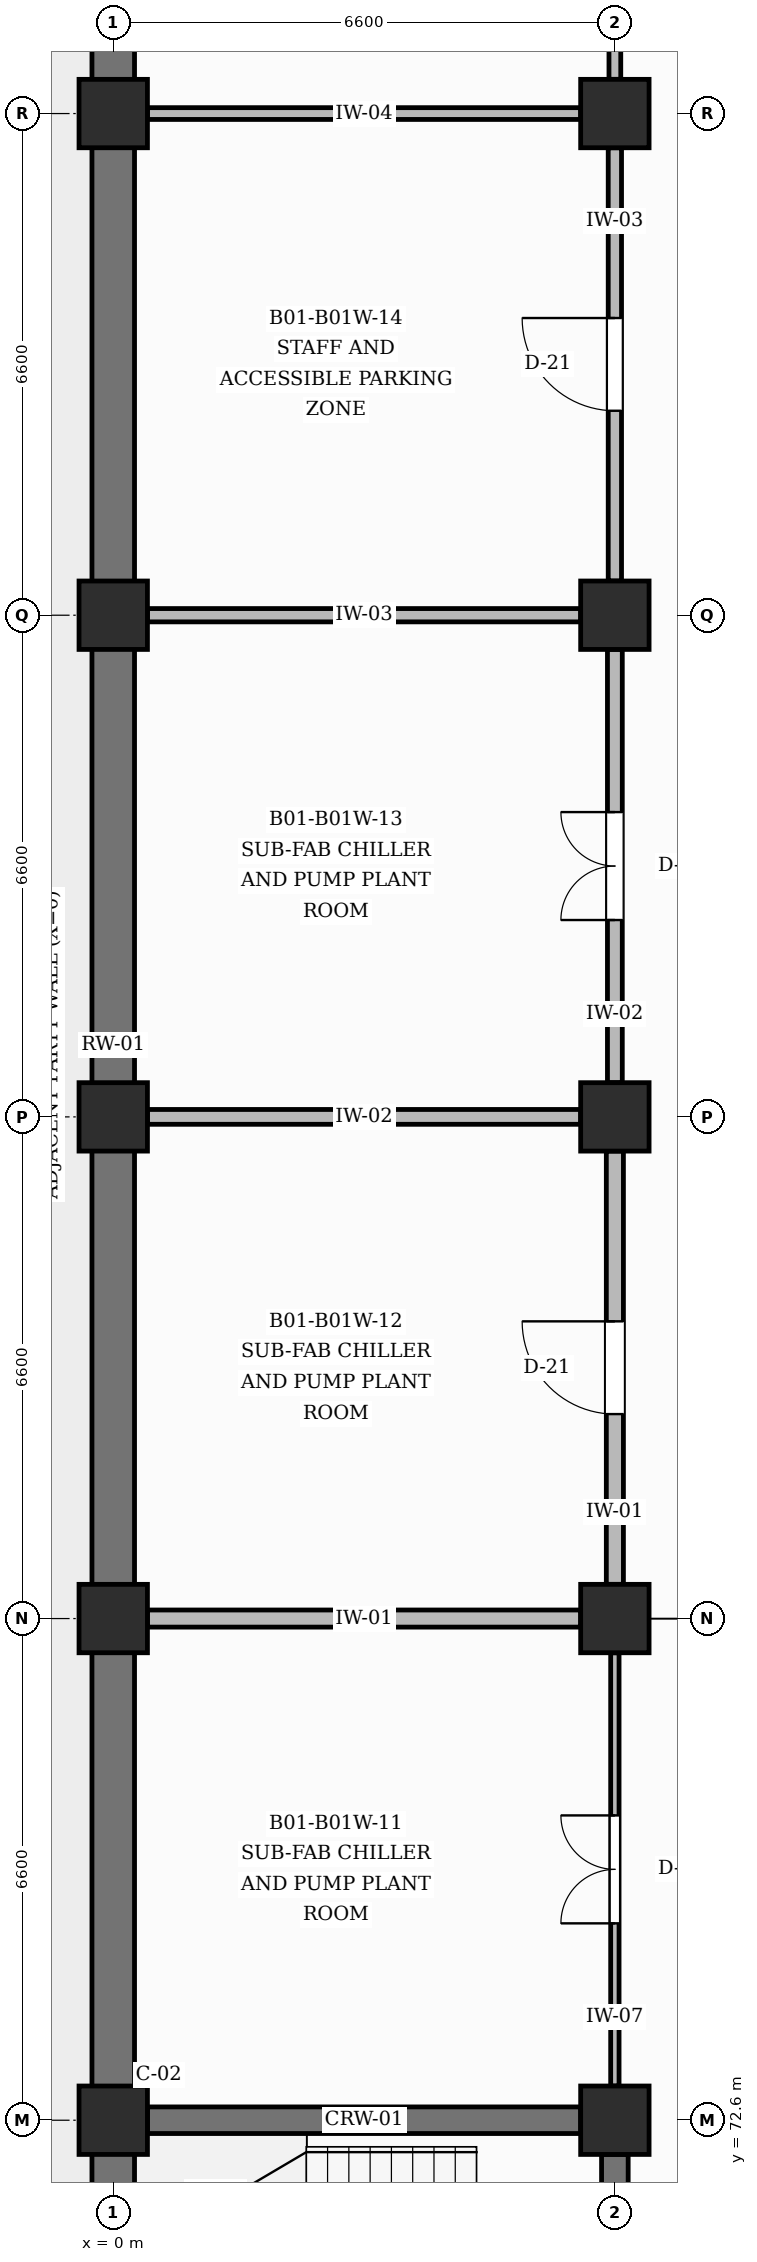
"""IFC4 building model, lengths in metres.
Left out: names, types, materials, properties, quantities, classifications, styles, units other than length and angle.
Written with IfcOpenShell. Run it as: python <this file> out.ifc"""

import sys

from ifc_helpers import new_model, si_unit, direction, frame, frame_2d, origin, origin_2d, place, context, subcontext, project, spatial, rectangle, extrude, element, fill, save


model = new_model("IFC4")
c1 = context("Model", 3, precision=1e-05, world=origin(), true_north=direction((0.0, 1.0)))
c2 = subcontext(c1, "Body", "Model", "MODEL_VIEW")
j1 = project(units=[si_unit("LENGTHUNIT", "METRE"), si_unit("PLANEANGLEUNIT", "RADIAN")], contexts=[c1])
p1 = place(None, origin())
s1 = spatial("IfcSite", under=j1, at=p1, CompositionType="ELEMENT")
p2 = place(p1, origin())
s2 = spatial("IfcBuilding", under=s1, at=p2, CompositionType="ELEMENT")
p3 = place(p2, frame((0.0, 0.0, -4.5)))
s3 = spatial("IfcBuildingStorey", under=s2, at=p3, CompositionType="ELEMENT", Elevation=-4.5)
for number, where, z_axis, x_axis in (
    (1, (0.0, 72.6, 0.0), (0.0, 0.0, 1.0), (1.0, 0.0, 0.0)),
    (2, (0.0, 79.2, 0.0), (0.0, 0.0, 1.0), (1.0, 0.0, 0.0)),
    (3, (0.0, 85.8, 0.0), (0.0, 0.0, 1.0), (1.0, 0.0, 0.0)),
    (4, (0.0, 92.4, 0.0), (0.0, 0.0, 1.0), (1.0, 0.0, 0.0)),
    (5, (0.0, 99.0, 0.0), (0.0, 0.0, 1.0), (1.0, 0.0, 0.0)),
    (6, (6.6, 72.6, 0.0), (0.0, 0.0, 1.0), (1.0, 0.0, 0.0)),
    (7, (6.6, 79.2, 0.0), (0.0, 0.0, 1.0), (1.0, 0.0, 0.0)),
    (8, (6.6, 85.8, 0.0), (0.0, 0.0, 1.0), (1.0, 0.0, 0.0)),
    (9, (6.6, 92.4, 0.0), (0.0, 0.0, 1.0), (1.0, 0.0, 0.0)),
    (10, (6.6, 99.0, 0.0), (0.0, 0.0, 1.0), (1.0, 0.0, 0.0)),
):
    element("IfcColumn", number, at=place(p3, frame(where, z_axis=z_axis, x_axis=x_axis)), inside=s3, PredefinedType="COLUMN", context=c2, shape_type="SweptSolid", body=[
        extrude(rectangle(XDim=0.9, YDim=0.9, at=origin_2d()), origin(), (0.0, 0.0, 1.0), 4.5),
    ])
for number, where, z_axis, x_axis in (
    (11, (0.0, 66.45, 0.0), (0.0, 0.0, 1.0), (0.0, 1.0, 0.0)),
    (12, (0.0, 73.05, 0.0), (0.0, 0.0, 1.0), (0.0, 1.0, 0.0)),
):
    element("IfcWall", number, at=place(p3, frame(where, z_axis=z_axis, x_axis=x_axis)), inside=s3, PredefinedType="USERDEFINED", context=c2, shape_type="SweptSolid", body=[
        extrude(rectangle(XDim=5.7, YDim=0.56, at=frame_2d((2.85, 0.0))), origin(), (0.0, 0.0, 1.0), 3.49),
    ])
p4 = place(p3, frame((0.0, 79.65, 0.0), z_axis=(0.0, 0.0, 1.0), x_axis=(0.0, 1.0, 0.0)))
e13 = element("IfcWall", 13, at=p4, inside=s3, PredefinedType="USERDEFINED", context=c2, shape_type="SweptSolid", body=[
    extrude(rectangle(XDim=5.7, YDim=0.56, at=frame_2d((2.85, 0.0))), origin(), (0.0, 0.0, 1.0), 3.49),
])
for number, where, z_axis, x_axis in (
    (14, (0.0, 86.25, 0.0), (0.0, 0.0, 1.0), (0.0, 1.0, 0.0)),
    (15, (0.0, 92.85, 0.0), (0.0, 0.0, 1.0), (0.0, 1.0, 0.0)),
    (16, (0.0, 99.45, 0.0), (0.0, 0.0, 1.0), (0.0, 1.0, 0.0)),
):
    element("IfcWall", number, at=place(p3, frame(where, z_axis=z_axis, x_axis=x_axis)), inside=s3, PredefinedType="USERDEFINED", context=c2, shape_type="SweptSolid", body=[
        extrude(rectangle(XDim=5.7, YDim=0.56, at=frame_2d((2.85, 0.0))), origin(), (0.0, 0.0, 1.0), 3.49),
    ])
p5 = place(p3, frame((0.45, 72.6, 0.0), z_axis=(0.0, 0.0, 1.0), x_axis=(1.0, 0.0, 0.0)))
e17 = element("IfcWall", 17, at=p5, inside=s3, PredefinedType="SHEAR", context=c2, shape_type="SweptSolid", body=[
    extrude(rectangle(XDim=5.7, YDim=0.35, at=frame_2d((2.85, 0.0))), origin(), (0.0, 0.0, 1.0), 3.34),
])
p6 = place(p3, frame((6.6, 66.45, 0.0), z_axis=(0.0, 0.0, 1.0), x_axis=(0.0, 1.0, 0.0)))
e18 = element("IfcWall", 18, at=p6, inside=s3, PredefinedType="SHEAR", context=c2, shape_type="SweptSolid", body=[
    extrude(rectangle(XDim=5.7, YDim=0.35, at=frame_2d((2.85, 0.0))), origin(), (0.0, 0.0, 1.0), 3.34),
])
p7 = place(p6, frame((2.3, 0.0, 0.0)))
e19 = element("IfcOpeningElement", 19, at=p7, cuts=e18, PredefinedType="OPENING", context=c2, shape_type="SweptSolid", body=[
    extrude(rectangle(XDim=1.1, YDim=2.15, at=frame_2d((0.55, 1.075))), frame((0.0, 0.185, 0.0), z_axis=(0.0, -1.0, 0.0), x_axis=(1.0, 0.0, 0.0)), (0.0, 0.0, 1.0), 0.37),
])
p8 = place(p3, frame((6.6, 73.05, 0.0), z_axis=(0.0, 0.0, 1.0), x_axis=(0.0, 1.0, 0.0)))
e20 = element("IfcWall", 20, at=p8, inside=s3, PredefinedType="PARTITIONING", context=c2, shape_type="SweptSolid", body=[
    extrude(rectangle(XDim=5.7, YDim=0.11, at=frame_2d((2.85, 0.0))), origin(), (0.0, 0.0, 1.0), 3.34),
])
p9 = place(p8, frame((2.14, 0.0, 0.0)))
e21 = element("IfcOpeningElement", 21, at=p9, cuts=e20, PredefinedType="OPENING", context=c2, shape_type="SweptSolid", body=[
    extrude(rectangle(XDim=1.42, YDim=2.2, at=frame_2d((0.71, 1.1))), frame((0.0, 0.065, 0.0), z_axis=(0.0, -1.0, 0.0), x_axis=(1.0, 0.0, 0.0)), (0.0, 0.0, 1.0), 0.13),
])
p10 = place(p3, frame((0.45, 79.2, 0.0), z_axis=(0.0, 0.0, 1.0), x_axis=(1.0, 0.0, 0.0)))
e22 = element("IfcWall", 22, at=p10, inside=s3, PredefinedType="PARTITIONING", context=c2, shape_type="SweptSolid", body=[
    extrude(rectangle(XDim=5.7, YDim=0.225, at=frame_2d((2.85, 0.0))), origin(), (0.0, 0.0, 1.0), 3.24),
])
p11 = place(p3, frame((6.6, 79.65, 0.0), z_axis=(0.0, 0.0, 1.0), x_axis=(0.0, 1.0, 0.0)))
e23 = element("IfcWall", 23, at=p11, inside=s3, PredefinedType="PARTITIONING", context=c2, shape_type="SweptSolid", body=[
    extrude(rectangle(XDim=5.7, YDim=0.225, at=frame_2d((2.85, 0.0))), origin(), (0.0, 0.0, 1.0), 3.34),
])
p12 = place(p11, frame((2.24, 0.0, 0.0)))
e24 = element("IfcOpeningElement", 24, at=p12, cuts=e23, PredefinedType="OPENING", context=c2, shape_type="SweptSolid", body=[
    extrude(rectangle(XDim=1.22, YDim=2.15, at=frame_2d((0.61, 1.075))), frame((0.0, 0.123, 0.0), z_axis=(0.0, -1.0, 0.0), x_axis=(1.0, 0.0, 0.0)), (0.0, 0.0, 1.0), 0.245),
])
p13 = place(p3, frame((0.45, 85.8, 0.0), z_axis=(0.0, 0.0, 1.0), x_axis=(1.0, 0.0, 0.0)))
e25 = element("IfcWall", 25, at=p13, inside=s3, PredefinedType="PARTITIONING", context=c2, shape_type="SweptSolid", body=[
    extrude(rectangle(XDim=5.7, YDim=0.195, at=frame_2d((2.85, 0.0))), origin(), (0.0, 0.0, 1.0), 3.34),
])
p14 = place(p3, frame((6.6, 86.25, 0.0), z_axis=(0.0, 0.0, 1.0), x_axis=(0.0, 1.0, 0.0)))
e26 = element("IfcWall", 26, at=p14, inside=s3, PredefinedType="PARTITIONING", context=c2, shape_type="SweptSolid", body=[
    extrude(rectangle(XDim=5.7, YDim=0.195, at=frame_2d((2.85, 0.0))), origin(), (0.0, 0.0, 1.0), 3.34),
])
p15 = place(p14, frame((2.14, 0.0, 0.0)))
e27 = element("IfcOpeningElement", 27, at=p15, cuts=e26, PredefinedType="OPENING", context=c2, shape_type="SweptSolid", body=[
    extrude(rectangle(XDim=1.42, YDim=2.2, at=frame_2d((0.71, 1.1))), frame((0.0, 0.107, 0.0), z_axis=(0.0, -1.0, 0.0), x_axis=(1.0, 0.0, 0.0)), (0.0, 0.0, 1.0), 0.215),
])
p16 = place(p3, frame((0.45, 92.4, 0.0), z_axis=(0.0, 0.0, 1.0), x_axis=(1.0, 0.0, 0.0)))
e28 = element("IfcWall", 28, at=p16, inside=s3, PredefinedType="PARTITIONING", context=c2, shape_type="SweptSolid", body=[
    extrude(rectangle(XDim=5.7, YDim=0.175, at=frame_2d((2.85, 0.0))), origin(), (0.0, 0.0, 1.0), 3.24),
])
p17 = place(p3, frame((6.6, 92.85, 0.0), z_axis=(0.0, 0.0, 1.0), x_axis=(0.0, 1.0, 0.0)))
e29 = element("IfcWall", 29, at=p17, inside=s3, PredefinedType="PARTITIONING", context=c2, shape_type="SweptSolid", body=[
    extrude(rectangle(XDim=5.7, YDim=0.175, at=frame_2d((2.85, 0.0))), origin(), (0.0, 0.0, 1.0), 3.34),
])
p18 = place(p17, frame((2.24, 0.0, 0.0)))
e30 = element("IfcOpeningElement", 30, at=p18, cuts=e29, PredefinedType="OPENING", context=c2, shape_type="SweptSolid", body=[
    extrude(rectangle(XDim=1.22, YDim=2.15, at=frame_2d((0.61, 1.075))), frame((0.0, 0.097, 0.0), z_axis=(0.0, -1.0, 0.0), x_axis=(1.0, 0.0, 0.0)), (0.0, 0.0, 1.0), 0.195),
])
p19 = place(p3, frame((0.45, 99.0, 0.0), z_axis=(0.0, 0.0, 1.0), x_axis=(1.0, 0.0, 0.0)))
e31 = element("IfcWall", 31, at=p19, inside=s3, PredefinedType="PARTITIONING", context=c2, shape_type="SweptSolid", body=[
    extrude(rectangle(XDim=5.7, YDim=0.155, at=frame_2d((2.85, 0.0))), origin(), (0.0, 0.0, 1.0), 3.34),
])
p20 = place(p3, frame((6.6, 99.45, 0.0), z_axis=(0.0, 0.0, 1.0), x_axis=(0.0, 1.0, 0.0)))
e32 = element("IfcWall", 32, at=p20, inside=s3, PredefinedType="PARTITIONING", context=c2, shape_type="SweptSolid", body=[
    extrude(rectangle(XDim=5.7, YDim=0.155, at=frame_2d((2.85, 0.0))), origin(), (0.0, 0.0, 1.0), 3.34),
])
p21 = place(p20, frame((2.14, 0.0, 0.0)))
e33 = element("IfcOpeningElement", 33, at=p21, cuts=e32, PredefinedType="OPENING", context=c2, shape_type="SweptSolid", body=[
    extrude(rectangle(XDim=1.42, YDim=2.2, at=frame_2d((0.71, 1.1))), frame((0.0, 0.087, 0.0), z_axis=(0.0, -1.0, 0.0), x_axis=(1.0, 0.0, 0.0)), (0.0, 0.0, 1.0), 0.175),
])
p22 = place(p9, origin())
e34 = element("IfcDoor", 34, at=p22, inside=s3, OperationType="DOUBLE_DOOR_SINGLE_SWING", PredefinedType="DOOR", context=c2, shape_type="SweptSolid", body=[
    extrude(rectangle(XDim=1.42, YDim=2.2, at=frame_2d((0.71, 1.1))), frame((0.0, 0.025, 0.0), z_axis=(0.0, -1.0, 0.0), x_axis=(1.0, 0.0, 0.0)), (0.0, 0.0, 1.0), 0.05),
])
fill(e21, e34)
p23 = place(p12, origin())
e35 = element("IfcDoor", 35, at=p23, inside=s3, OperationType="SINGLE_SWING_RIGHT", PredefinedType="DOOR", context=c2, shape_type="SweptSolid", body=[
    extrude(rectangle(XDim=1.22, YDim=2.15, at=frame_2d((0.61, 1.075))), frame((0.0, 0.025, 0.0), z_axis=(0.0, -1.0, 0.0), x_axis=(1.0, 0.0, 0.0)), (0.0, 0.0, 1.0), 0.05),
])
fill(e24, e35)
p24 = place(p15, origin())
e36 = element("IfcDoor", 36, at=p24, inside=s3, OperationType="DOUBLE_DOOR_SINGLE_SWING", PredefinedType="DOOR", context=c2, shape_type="SweptSolid", body=[
    extrude(rectangle(XDim=1.42, YDim=2.2, at=frame_2d((0.71, 1.1))), frame((0.0, 0.025, 0.0), z_axis=(0.0, -1.0, 0.0), x_axis=(1.0, 0.0, 0.0)), (0.0, 0.0, 1.0), 0.05),
])
fill(e27, e36)
p25 = place(p18, origin())
e37 = element("IfcDoor", 37, at=p25, inside=s3, OperationType="SINGLE_SWING_RIGHT", PredefinedType="DOOR", context=c2, shape_type="SweptSolid", body=[
    extrude(rectangle(XDim=1.22, YDim=2.15, at=frame_2d((0.61, 1.075))), frame((0.0, 0.025, 0.0), z_axis=(0.0, -1.0, 0.0), x_axis=(1.0, 0.0, 0.0)), (0.0, 0.0, 1.0), 0.05),
])
fill(e30, e37)
save(model, sys.argv[1])
